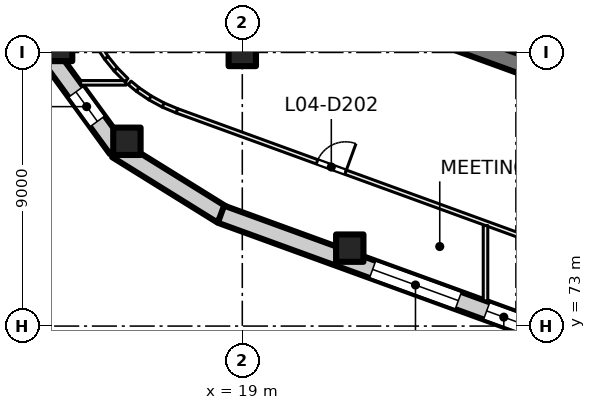
"""IFC4 building model, lengths in metres.
Left out: names, types, materials, properties, quantities, classifications, styles, units other than length and angle.
Written with IfcOpenShell. Run it as: python <this file> out.ifc"""

import sys

from ifc_helpers import new_model, si_unit, direction, frame, frame_2d, origin, origin_2d, place, context, subcontext, project, spatial, rectangle, extrude, element, fill, save


model = new_model("IFC4")
c1 = context("Model", 3, precision=1e-05, world=origin(), true_north=direction((0.0, 1.0)))
c2 = subcontext(c1, "Body", "Model", "MODEL_VIEW")
j1 = project(units=[si_unit("LENGTHUNIT", "METRE"), si_unit("PLANEANGLEUNIT", "RADIAN")], contexts=[c1])
p1 = place(None, origin())
s1 = spatial("IfcSite", under=j1, at=p1, CompositionType="ELEMENT")
p2 = place(p1, origin())
s2 = spatial("IfcBuilding", under=s1, at=p2, CompositionType="ELEMENT")
p3 = place(p2, frame((0.0, 0.0, 22.5)))
s3 = spatial("IfcBuildingStorey", under=s2, at=p3, CompositionType="ELEMENT", Elevation=22.5)
for number, where, z_axis, x_axis in (
    (1, (19.0, 82.0, 0.0), (0.0, 0.0, 1.0), (1.0, 0.0, 0.0)),
    (2, (22.535, 75.563, 0.0), (0.0, 0.0, 1.0), (1.0, 0.0, 0.0)),
    (3, (15.205, 79.078, 0.0), (0.0, 0.0, 1.0), (1.0, 0.0, 0.0)),
    (4, (12.958, 82.164, 0.0), (0.0, 0.0, 1.0), (1.0, 0.0, 0.0)),
):
    element("IfcColumn", number, at=place(p3, frame(where, z_axis=z_axis, x_axis=x_axis)), inside=s3, PredefinedType="COLUMN", context=c2, shape_type="SweptSolid", body=[
        extrude(rectangle(XDim=0.9, YDim=0.9, at=origin_2d()), origin(), (0.0, 0.0, 1.0), 5.0),
    ])
p4 = place(p3, frame((35.767, 78.835, 0.0), z_axis=(0.0, 0.0, 1.0), x_axis=(-0.939692894512, 0.342019391267, 0.0)))
e5 = element("IfcWall", 5, at=p4, inside=s3, PredefinedType="SHEAR", context=c2, shape_type="SweptSolid", body=[
    extrude(rectangle(XDim=14.4, YDim=0.6, at=frame_2d((7.2, 0.0))), origin(), (0.0, 0.0, 1.0), 5.0),
])
p5 = place(p3, frame((12.571, 82.061, 0.0), z_axis=(0.0, 0.0, 1.0), x_axis=(-0.240896747667, 0.970550749298, 0.0)))
e6 = element("IfcWall", 6, at=p5, inside=s3, PredefinedType="SOLIDWALL", context=c2, shape_type="SweptSolid", body=[
    extrude(rectangle(XDim=3.962, YDim=0.6, at=frame_2d((1.981, 0.0))), origin(), (0.0, 0.0, 1.0), 4.625),
])
p6 = place(p3, frame((14.885, 78.837, 0.0), z_axis=(0.0, 0.0, 1.0), x_axis=(-0.588600339707, 0.808424170901, 0.0)))
e7 = element("IfcWall", 7, at=p6, inside=s3, PredefinedType="SOLIDWALL", context=c2, shape_type="SweptSolid", body=[
    extrude(rectangle(XDim=3.962, YDim=0.6, at=frame_2d((1.981, 0.0))), origin(), (0.0, 0.0, 1.0), 4.625),
])
p7 = place(p6, frame((1.108, 0.0, 0.9)))
e8 = element("IfcOpeningElement", 8, at=p7, cuts=e7, PredefinedType="OPENING", context=c2, shape_type="SweptSolid", body=[
    extrude(rectangle(XDim=1.2, YDim=3.0, at=frame_2d((0.6, 1.5))), frame((0.0, 0.31, 0.0), z_axis=(0.0, -1.0, 0.0), x_axis=(1.0, 0.0, 0.0)), (0.0, 0.0, 1.0), 0.62),
])
p8 = place(p3, frame((18.329, 76.668, 0.0), z_axis=(0.0, 0.0, 1.0), x_axis=(-0.849679171995, 0.527300013918, 0.0)))
e9 = element("IfcWall", 9, at=p8, inside=s3, PredefinedType="SOLIDWALL", context=c2, shape_type="SweptSolid", body=[
    extrude(rectangle(XDim=4.062, YDim=0.6, at=frame_2d((2.031, 0.0))), origin(), (0.0, 0.0, 1.0), 4.625),
])
p9 = place(p3, frame((34.204, 70.89, 0.0), z_axis=(0.0, 0.0, 1.0), x_axis=(-0.939693996621, 0.342016363227, 0.0)))
e10 = element("IfcWall", 10, at=p9, inside=s3, PredefinedType="SOLIDWALL", context=c2, shape_type="SweptSolid", body=[
    extrude(rectangle(XDim=16.926, YDim=0.6, at=frame_2d((8.463, 0.0))), origin(), (0.0, 0.0, 1.0), 4.625),
])
p10 = place(p9, frame((6.426, 0.0, 0.9)))
e11 = element("IfcOpeningElement", 11, at=p10, cuts=e10, PredefinedType="OPENING", context=c2, shape_type="SweptSolid", body=[
    extrude(rectangle(XDim=1.2, YDim=3.0, at=frame_2d((0.6, 1.5))), frame((0.0, 0.31, 0.0), z_axis=(0.0, -1.0, 0.0), x_axis=(1.0, 0.0, 0.0)), (0.0, 0.0, 1.0), 0.62),
])
p11 = place(p9, frame((8.618, 0.0, 0.9)))
e12 = element("IfcOpeningElement", 12, at=p11, cuts=e10, PredefinedType="OPENING", context=c2, shape_type="SweptSolid", body=[
    extrude(rectangle(XDim=3.0, YDim=3.0, at=frame_2d((1.5, 1.5))), frame((0.0, 0.31, 0.0), z_axis=(0.0, -1.0, 0.0), x_axis=(1.0, 0.0, 0.0)), (0.0, 0.0, 1.0), 0.62),
])
p12 = place(p3, frame((13.681, 81.0, 0.0), z_axis=(0.0, 0.0, 1.0), x_axis=(1.0, 0.0, 0.0)))
e13 = element("IfcWall", 13, at=p12, inside=s3, PredefinedType="PARTITIONING", context=c2, shape_type="SweptSolid", body=[
    extrude(rectangle(XDim=1.495, YDim=0.15, at=frame_2d((0.748, 0.0))), origin(), (0.0, 0.0, 1.0), 4.625),
])
for number, where, z_axis, x_axis in (
    (14, (14.258, 82.234, 0.0), (0.0, 0.0, 1.0), (0.55, -0.835, 0.0)),
    (15, (14.528, 81.824, 0.0), (0.0, 0.0, 1.0), (0.629, -0.778, 0.0)),
):
    element("IfcWall", number, at=place(p3, frame(where, z_axis=z_axis, x_axis=x_axis)), inside=s3, PredefinedType="PARTITIONING", context=c2, shape_type="SweptSolid", body=[
        extrude(rectangle(XDim=0.498, YDim=0.15, at=frame_2d((0.249, 0.0))), origin(), (0.0, 0.0, 1.0), 4.625),
    ])
p13 = place(p3, frame((14.836, 81.443, 0.0), z_axis=(0.0, 0.0, 1.0), x_axis=(0.702939506556, -0.711249639805, 0.0)))
e16 = element("IfcWall", 16, at=p13, inside=s3, PredefinedType="PARTITIONING", context=c2, shape_type="SweptSolid", body=[
    extrude(rectangle(XDim=0.5, YDim=0.15, at=frame_2d((0.25, 0.0))), origin(), (0.0, 0.0, 1.0), 4.625),
])
p14 = place(p3, frame((15.294, 81.0, 0.0), z_axis=(0.0, 0.0, 1.0), x_axis=(0.770605931108, -0.637311932213, 0.0)))
e17 = element("IfcWall", 17, at=p14, inside=s3, PredefinedType="PARTITIONING", context=c2, shape_type="SweptSolid", body=[
    extrude(rectangle(XDim=0.352, YDim=0.15, at=frame_2d((0.176, 0.0))), origin(), (0.0, 0.0, 1.0), 4.625),
])
p15 = place(p3, frame((15.559, 80.78, 0.0), z_axis=(0.0, 0.0, 1.0), x_axis=(0.828490672822, -0.560002861641, 0.0)))
e18 = element("IfcWall", 18, at=p15, inside=s3, PredefinedType="PARTITIONING", context=c2, shape_type="SweptSolid", body=[
    extrude(rectangle(XDim=0.498, YDim=0.15, at=frame_2d((0.249, 0.0))), origin(), (0.0, 0.0, 1.0), 4.625),
])
p16 = place(p3, frame((15.966, 80.505, 0.0), z_axis=(0.0, 0.0, 1.0), x_axis=(0.878382708813, -0.477957965577, 0.0)))
e19 = element("IfcWall", 19, at=p16, inside=s3, PredefinedType="PARTITIONING", context=c2, shape_type="SweptSolid", body=[
    extrude(rectangle(XDim=0.498, YDim=0.15, at=frame_2d((0.249, 0.0))), origin(), (0.0, 0.0, 1.0), 4.625),
])
p17 = place(p3, frame((16.397, 80.27, 0.0), z_axis=(0.0, 0.0, 1.0), x_axis=(0.921848433773, -0.387550596891, 0.0)))
e20 = element("IfcWall", 20, at=p17, inside=s3, PredefinedType="PARTITIONING", context=c2, shape_type="SweptSolid", body=[
    extrude(rectangle(XDim=0.496, YDim=0.15, at=frame_2d((0.248, 0.0))), origin(), (0.0, 0.0, 1.0), 4.625),
])
p18 = place(p3, frame((37.528, 72.554, 0.0), z_axis=(0.0, 0.0, 1.0), x_axis=(-0.939693287343, 0.34201831197, 0.0)))
e21 = element("IfcWall", 21, at=p18, inside=s3, PredefinedType="PARTITIONING", context=c2, shape_type="SweptSolid", body=[
    extrude(rectangle(XDim=22.005, YDim=0.15, at=frame_2d((11.002, 0.0))), origin(), (0.0, 0.0, 1.0), 4.625),
])
p19 = place(p18, frame((16.101, 0.0, 0.0)))
e22 = element("IfcOpeningElement", 22, at=p19, cuts=e21, PredefinedType="OPENING", context=c2, shape_type="SweptSolid", body=[
    extrude(rectangle(XDim=1.0, YDim=2.1, at=frame_2d((0.5, 1.05))), frame((0.0, 0.085, 0.0), z_axis=(0.0, -1.0, 0.0), x_axis=(1.0, 0.0, 0.0)), (0.0, 0.0, 1.0), 0.17),
])
p20 = place(p18, frame((5.105, 0.0, 0.0)))
e23 = element("IfcOpeningElement", 23, at=p20, cuts=e21, PredefinedType="OPENING", context=c2, shape_type="SweptSolid", body=[
    extrude(rectangle(XDim=1.0, YDim=2.1, at=frame_2d((0.5, 1.05))), frame((0.0, 0.085, 0.0), z_axis=(0.0, -1.0, 0.0), x_axis=(1.0, 0.0, 0.0)), (0.0, 0.0, 1.0), 0.17),
])
p21 = place(p3, frame((27.0, 73.832, 0.0), z_axis=(0.0, 0.0, 1.0), x_axis=(0.0, 1.0, 0.0)))
e24 = element("IfcWall", 24, at=p21, inside=s3, PredefinedType="PARTITIONING", context=c2, shape_type="SweptSolid", body=[
    extrude(rectangle(XDim=2.474, YDim=0.15, at=frame_2d((1.237, 0.0))), origin(), (0.0, 0.0, 1.0), 4.625),
])
p22 = place(p7, origin())
e25 = element("IfcWindow", 25, at=p22, inside=s3, PartitioningType="SINGLE_PANEL", PredefinedType="WINDOW", context=c2, shape_type="SweptSolid", body=[
    extrude(rectangle(XDim=1.2, YDim=3.0, at=frame_2d((0.6, 1.5))), frame((0.0, 0.03, 0.0), z_axis=(0.0, -1.0, 0.0), x_axis=(1.0, 0.0, 0.0)), (0.0, 0.0, 1.0), 0.06),
])
fill(e8, e25)
p23 = place(p10, origin())
e26 = element("IfcWindow", 26, at=p23, inside=s3, PartitioningType="SINGLE_PANEL", PredefinedType="WINDOW", context=c2, shape_type="SweptSolid", body=[
    extrude(rectangle(XDim=1.2, YDim=3.0, at=frame_2d((0.6, 1.5))), frame((0.0, 0.03, 0.0), z_axis=(0.0, -1.0, 0.0), x_axis=(1.0, 0.0, 0.0)), (0.0, 0.0, 1.0), 0.06),
])
fill(e11, e26)
p24 = place(p11, origin())
e27 = element("IfcWindow", 27, at=p24, inside=s3, PartitioningType="SINGLE_PANEL", PredefinedType="WINDOW", context=c2, shape_type="SweptSolid", body=[
    extrude(rectangle(XDim=3.0, YDim=3.0, at=frame_2d((1.5, 1.5))), frame((0.0, 0.03, 0.0), z_axis=(0.0, -1.0, 0.0), x_axis=(1.0, 0.0, 0.0)), (0.0, 0.0, 1.0), 0.06),
])
fill(e12, e27)
p25 = place(p19, origin())
e28 = element("IfcDoor", 28, at=p25, inside=s3, OperationType="SINGLE_SWING_LEFT", PredefinedType="DOOR", context=c2, shape_type="SweptSolid", body=[
    extrude(rectangle(XDim=1.0, YDim=2.1, at=frame_2d((0.5, 1.05))), frame((0.0, 0.025, 0.0), z_axis=(0.0, -1.0, 0.0), x_axis=(1.0, 0.0, 0.0)), (0.0, 0.0, 1.0), 0.05),
])
fill(e22, e28)
save(model, sys.argv[1])
